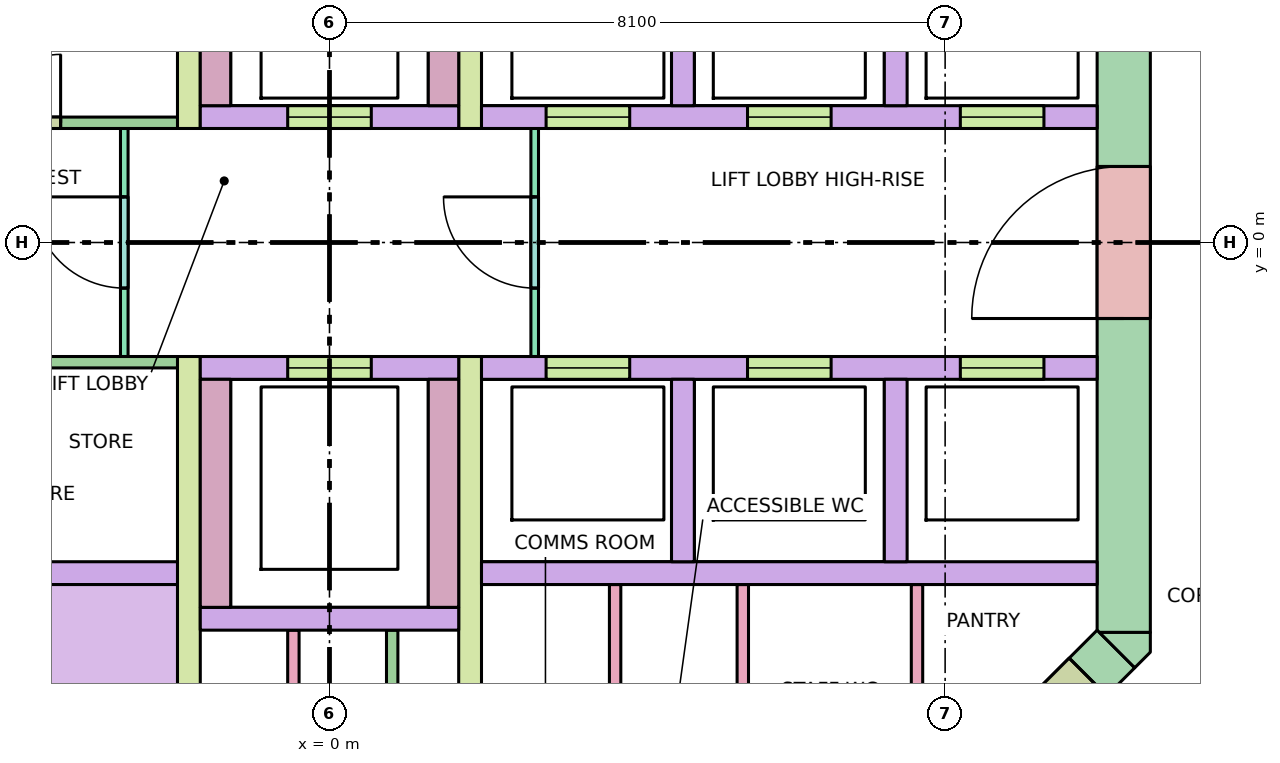
"""IFC4 building model, lengths in metres.
Left out: names, types, materials, properties, quantities, classifications, styles, units other than length and angle.
Written with IfcOpenShell. Run it as: python <this file> out.ifc"""

import sys

from ifc_helpers import new_model, si_unit, direction, frame, frame_2d, origin, place, context, subcontext, project, spatial, polyline, rectangle, outline, extrude, element, fill, save


model = new_model("IFC4")
c1 = context("Model", 3, precision=1e-05, world=origin(), true_north=direction((0.0, 1.0)))
c2 = subcontext(c1, "Body", "Model", "MODEL_VIEW")
j1 = project(units=[si_unit("LENGTHUNIT", "METRE"), si_unit("PLANEANGLEUNIT", "RADIAN")], contexts=[c1])
p1 = place(None, origin())
s1 = spatial("IfcSite", under=j1, at=p1, CompositionType="ELEMENT")
p2 = place(p1, origin())
s2 = spatial("IfcBuilding", under=s1, at=p2, CompositionType="ELEMENT")
p3 = place(p2, frame((0.0, 0.0, 215.0)))
s3 = spatial("IfcBuildingStorey", under=s2, at=p3, CompositionType="ELEMENT", Elevation=215.0)
p4 = place(p3, frame((10.45, -5.13, -0.28), z_axis=(0.0, 0.0, 1.0), x_axis=(0.0, 1.0, 0.0)))
e1 = element("IfcWall", 1, at=p4, inside=s3, PredefinedType="SHEAR", context=c2, shape_type="SweptSolid", body=[
    extrude(rectangle(XDim=10.26, YDim=0.7, at=frame_2d((5.13, 0.0))), origin(), (0.0, 0.0, 1.0), 3.7),
])
p5 = place(p4, frame((4.13, 0.0, 0.28)))
e2 = element("IfcOpeningElement", 2, at=p5, cuts=e1, PredefinedType="OPENING", context=c2, shape_type="SweptSolid", body=[
    extrude(rectangle(XDim=2.0, YDim=2.1, at=frame_2d((1.0, 1.05))), frame((0.0, 0.36, 0.0), z_axis=(0.0, -1.0, 0.0), x_axis=(1.0, 0.0, 0.0)), (0.0, 0.0, 1.0), 0.72),
])
p6 = place(p3, frame((10.347, -5.347, -0.28), z_axis=(0.0, 0.0, 1.0), x_axis=(-0.707106781187, -0.707106781187, 0.0)))
e3 = element("IfcWall", 3, at=p6, inside=s3, PredefinedType="SHEAR", context=c2, shape_type="SweptSolid", body=[
    extrude(rectangle(XDim=4.243, YDim=0.7, at=frame_2d((2.121, 0.0))), origin(), (0.0, 0.0, 1.0), 3.7),
])
p7 = place(p6, frame((0.52, 0.0, 0.28)))
e4 = element("IfcOpeningElement", 4, at=p7, cuts=e3, PredefinedType="OPENING", context=c2, shape_type="SweptSolid", body=[
    extrude(rectangle(XDim=0.9, YDim=2.1, at=frame_2d((0.45, 1.05))), frame((0.0, 0.36, 0.0), z_axis=(0.0, -1.0, 0.0), x_axis=(1.0, 0.0, 0.0)), (0.0, 0.0, 1.0), 0.72),
])
p8 = place(p3, frame((0.0, 0.0, -0.28)))
e5 = element("IfcWall", 5, at=p8, inside=s3, PredefinedType="SHEAR", context=c2, shape_type="SweptSolid", body=[
    extrude(outline(polyline([(10.8, -5.39), (10.595, -5.595), (10.595, -5.595), (10.595, -5.595), (10.13, -5.13), (10.8, -5.13), (10.8, -5.13), (10.8, -5.39)])), origin(), (0.0, 0.0, 1.0), 3.7),
])
for number, where, z_axis, x_axis in (
    (6, (-10.1, -4.35, 0.0), (0.0, 0.0, 1.0), (1.0, 0.0, 0.0)),
    (7, (2.0, -4.35, 0.0), (0.0, 0.0, 1.0), (1.0, 0.0, 0.0)),
):
    element("IfcWall", number, at=place(p3, frame(where, z_axis=z_axis, x_axis=x_axis)), inside=s3, PredefinedType="SOLIDWALL", context=c2, shape_type="SweptSolid", body=[
        extrude(rectangle(XDim=8.1, YDim=0.3, at=frame_2d((4.05, 0.0))), origin(), (0.0, 0.0, 1.0), 3.42),
    ])
p9 = place(p3, frame((2.0, 1.65, 0.0), z_axis=(0.0, 0.0, 1.0), x_axis=(1.0, 0.0, 0.0)))
e8 = element("IfcWall", 8, at=p9, inside=s3, PredefinedType="SOLIDWALL", context=c2, shape_type="SweptSolid", body=[
    extrude(rectangle(XDim=8.1, YDim=0.3, at=frame_2d((4.05, 0.0))), origin(), (0.0, 0.0, 1.0), 3.42),
])
p10 = place(p9, frame((0.85, 0.0, 0.0)))
e9 = element("IfcOpeningElement", 9, at=p10, cuts=e8, PredefinedType="OPENING", context=c2, shape_type="SweptSolid", body=[
    extrude(rectangle(XDim=1.1, YDim=2.1, at=frame_2d((0.55, 1.05))), frame((0.0, 0.16, 0.0), z_axis=(0.0, -1.0, 0.0), x_axis=(1.0, 0.0, 0.0)), (0.0, 0.0, 1.0), 0.32),
])
p11 = place(p9, frame((3.5, 0.0, 0.0)))
e10 = element("IfcOpeningElement", 10, at=p11, cuts=e8, PredefinedType="OPENING", context=c2, shape_type="SweptSolid", body=[
    extrude(rectangle(XDim=1.1, YDim=2.1, at=frame_2d((0.55, 1.05))), frame((0.0, 0.16, 0.0), z_axis=(0.0, -1.0, 0.0), x_axis=(1.0, 0.0, 0.0)), (0.0, 0.0, 1.0), 0.32),
])
p12 = place(p9, frame((6.3, 0.0, 0.0)))
e11 = element("IfcOpeningElement", 11, at=p12, cuts=e8, PredefinedType="OPENING", context=c2, shape_type="SweptSolid", body=[
    extrude(rectangle(XDim=1.1, YDim=2.1, at=frame_2d((0.55, 1.05))), frame((0.0, 0.16, 0.0), z_axis=(0.0, -1.0, 0.0), x_axis=(1.0, 0.0, 0.0)), (0.0, 0.0, 1.0), 0.32),
])
p13 = place(p3, frame((2.0, -1.65, 0.0), z_axis=(0.0, 0.0, 1.0), x_axis=(1.0, 0.0, 0.0)))
e12 = element("IfcWall", 12, at=p13, inside=s3, PredefinedType="SOLIDWALL", context=c2, shape_type="SweptSolid", body=[
    extrude(rectangle(XDim=8.1, YDim=0.3, at=frame_2d((4.05, 0.0))), origin(), (0.0, 0.0, 1.0), 3.42),
])
p14 = place(p13, frame((0.85, 0.0, 0.0)))
e13 = element("IfcOpeningElement", 13, at=p14, cuts=e12, PredefinedType="OPENING", context=c2, shape_type="SweptSolid", body=[
    extrude(rectangle(XDim=1.1, YDim=2.1, at=frame_2d((0.55, 1.05))), frame((0.0, 0.16, 0.0), z_axis=(0.0, -1.0, 0.0), x_axis=(1.0, 0.0, 0.0)), (0.0, 0.0, 1.0), 0.32),
])
p15 = place(p13, frame((3.5, 0.0, 0.0)))
e14 = element("IfcOpeningElement", 14, at=p15, cuts=e12, PredefinedType="OPENING", context=c2, shape_type="SweptSolid", body=[
    extrude(rectangle(XDim=1.1, YDim=2.1, at=frame_2d((0.55, 1.05))), frame((0.0, 0.16, 0.0), z_axis=(0.0, -1.0, 0.0), x_axis=(1.0, 0.0, 0.0)), (0.0, 0.0, 1.0), 0.32),
])
p16 = place(p13, frame((6.3, 0.0, 0.0)))
e15 = element("IfcOpeningElement", 15, at=p16, cuts=e12, PredefinedType="OPENING", context=c2, shape_type="SweptSolid", body=[
    extrude(rectangle(XDim=1.1, YDim=2.1, at=frame_2d((0.55, 1.05))), frame((0.0, 0.16, 0.0), z_axis=(0.0, -1.0, 0.0), x_axis=(1.0, 0.0, 0.0)), (0.0, 0.0, 1.0), 0.32),
])
for number, where, z_axis, x_axis in (
    (16, (4.65, 1.8, 0.0), (0.0, 0.0, 1.0), (0.0, 1.0, 0.0)),
    (17, (4.65, -4.2, 0.0), (0.0, 0.0, 1.0), (0.0, 1.0, 0.0)),
    (18, (7.45, 1.8, 0.0), (0.0, 0.0, 1.0), (0.0, 1.0, 0.0)),
    (19, (7.45, -4.2, 0.0), (0.0, 0.0, 1.0), (0.0, 1.0, 0.0)),
):
    element("IfcWall", number, at=place(p3, frame(where, z_axis=z_axis, x_axis=x_axis)), inside=s3, PredefinedType="SOLIDWALL", context=c2, shape_type="SweptSolid", body=[
        extrude(rectangle(XDim=2.4, YDim=0.3, at=frame_2d((1.2, 0.0))), origin(), (0.0, 0.0, 1.0), 3.42),
    ])
for number, where, z_axis, x_axis in (
    (20, (-1.85, 1.5, 0.0), (0.0, 0.0, 1.0), (0.0, 1.0, 0.0)),
    (21, (-1.85, -8.1, 0.0), (0.0, 0.0, 1.0), (0.0, 1.0, 0.0)),
    (22, (1.85, 1.5, 0.0), (0.0, 0.0, 1.0), (0.0, 1.0, 0.0)),
    (23, (1.85, -8.1, 0.0), (0.0, 0.0, 1.0), (0.0, 1.0, 0.0)),
):
    element("IfcWall", number, at=place(p3, frame(where, z_axis=z_axis, x_axis=x_axis)), inside=s3, PredefinedType="SHEAR", context=c2, shape_type="SweptSolid", body=[
        extrude(rectangle(XDim=6.6, YDim=0.3, at=frame_2d((3.3, 0.0))), origin(), (0.0, 0.0, 1.0), 3.42),
    ])
p17 = place(p3, frame((-1.7, 1.65, 0.0), z_axis=(0.0, 0.0, 1.0), x_axis=(1.0, 0.0, 0.0)))
e24 = element("IfcWall", 24, at=p17, inside=s3, PredefinedType="SOLIDWALL", context=c2, shape_type="SweptSolid", body=[
    extrude(rectangle(XDim=3.4, YDim=0.3, at=frame_2d((1.7, 0.0))), origin(), (0.0, 0.0, 1.0), 3.42),
])
p18 = place(p17, frame((1.15, 0.0, 0.0)))
e25 = element("IfcOpeningElement", 25, at=p18, cuts=e24, PredefinedType="OPENING", context=c2, shape_type="SweptSolid", body=[
    extrude(rectangle(XDim=1.1, YDim=2.1, at=frame_2d((0.55, 1.05))), frame((0.0, 0.16, 0.0), z_axis=(0.0, -1.0, 0.0), x_axis=(1.0, 0.0, 0.0)), (0.0, 0.0, 1.0), 0.32),
])
p19 = place(p3, frame((-1.7, -1.65, 0.0), z_axis=(0.0, 0.0, 1.0), x_axis=(1.0, 0.0, 0.0)))
e26 = element("IfcWall", 26, at=p19, inside=s3, PredefinedType="SOLIDWALL", context=c2, shape_type="SweptSolid", body=[
    extrude(rectangle(XDim=3.4, YDim=0.3, at=frame_2d((1.7, 0.0))), origin(), (0.0, 0.0, 1.0), 3.42),
])
p20 = place(p19, frame((1.15, 0.0, 0.0)))
e27 = element("IfcOpeningElement", 27, at=p20, cuts=e26, PredefinedType="OPENING", context=c2, shape_type="SweptSolid", body=[
    extrude(rectangle(XDim=1.1, YDim=2.1, at=frame_2d((0.55, 1.05))), frame((0.0, 0.16, 0.0), z_axis=(0.0, -1.0, 0.0), x_axis=(1.0, 0.0, 0.0)), (0.0, 0.0, 1.0), 0.32),
])
for number, where, z_axis, x_axis in (
    (28, (-1.5, 1.8, 0.0), (0.0, 0.0, 1.0), (0.0, 1.0, 0.0)),
    (29, (-1.5, -4.8, 0.0), (0.0, 0.0, 1.0), (0.0, 1.0, 0.0)),
    (30, (1.5, 1.8, 0.0), (0.0, 0.0, 1.0), (0.0, 1.0, 0.0)),
    (31, (1.5, -4.8, 0.0), (0.0, 0.0, 1.0), (0.0, 1.0, 0.0)),
):
    element("IfcWall", number, at=place(p3, frame(where, z_axis=z_axis, x_axis=x_axis)), inside=s3, PredefinedType="SOLIDWALL", context=c2, shape_type="SweptSolid", body=[
        extrude(rectangle(XDim=3.0, YDim=0.4, at=frame_2d((1.5, 0.0))), origin(), (0.0, 0.0, 1.0), 3.42),
    ])
p21 = place(p3, frame((-1.7, -4.95, 0.0), z_axis=(0.0, 0.0, 1.0), x_axis=(1.0, 0.0, 0.0)))
e32 = element("IfcWall", 32, at=p21, inside=s3, PredefinedType="SOLIDWALL", context=c2, shape_type="SweptSolid", body=[
    extrude(rectangle(XDim=3.4, YDim=0.3, at=frame_2d((1.7, 0.0))), origin(), (0.0, 0.0, 1.0), 3.42),
])
p22 = place(p3, frame((-2.7, -1.5, 0.0), z_axis=(0.0, 0.0, 1.0), x_axis=(0.0, 1.0, 0.0)))
e33 = element("IfcWall", 33, at=p22, inside=s3, PredefinedType="PARTITIONING", context=c2, shape_type="SweptSolid", body=[
    extrude(rectangle(XDim=3.0, YDim=0.1, at=frame_2d((1.5, 0.0))), origin(), (0.0, 0.0, 1.0), 3.42),
])
p23 = place(p22, frame((0.9, 0.0, 0.0)))
e34 = element("IfcOpeningElement", 34, at=p23, cuts=e33, PredefinedType="OPENING", context=c2, shape_type="SweptSolid", body=[
    extrude(rectangle(XDim=1.2, YDim=2.1, at=frame_2d((0.6, 1.05))), frame((0.0, 0.06, 0.0), z_axis=(0.0, -1.0, 0.0), x_axis=(1.0, 0.0, 0.0)), (0.0, 0.0, 1.0), 0.12),
])
p24 = place(p3, frame((2.7, -1.5, 0.0), z_axis=(0.0, 0.0, 1.0), x_axis=(0.0, 1.0, 0.0)))
e35 = element("IfcWall", 35, at=p24, inside=s3, PredefinedType="PARTITIONING", context=c2, shape_type="SweptSolid", body=[
    extrude(rectangle(XDim=3.0, YDim=0.1, at=frame_2d((1.5, 0.0))), origin(), (0.0, 0.0, 1.0), 3.42),
])
p25 = place(p24, frame((0.9, 0.0, 0.0)))
e36 = element("IfcOpeningElement", 36, at=p25, cuts=e35, PredefinedType="OPENING", context=c2, shape_type="SweptSolid", body=[
    extrude(rectangle(XDim=1.2, YDim=2.1, at=frame_2d((0.6, 1.05))), frame((0.0, 0.06, 0.0), z_axis=(0.0, -1.0, 0.0), x_axis=(1.0, 0.0, 0.0)), (0.0, 0.0, 1.0), 0.12),
])
for number, where, z_axis, x_axis in (
    (37, (0.825, -8.1, 0.0), (0.0, 0.0, 1.0), (0.0, 1.0, 0.0)),
    (38, (-0.475, -8.1, 0.0), (0.0, 0.0, 1.0), (0.0, 1.0, 0.0)),
):
    element("IfcWall", number, at=place(p3, frame(where, z_axis=z_axis, x_axis=x_axis)), inside=s3, PredefinedType="PARTITIONING", context=c2, shape_type="SweptSolid", body=[
        extrude(rectangle(XDim=3.0, YDim=0.15, at=frame_2d((1.5, 0.0))), origin(), (0.0, 0.0, 1.0), 3.42),
    ])
for number, where, z_axis, x_axis in (
    (39, (3.758, -8.1, 0.0), (0.0, 0.0, 1.0), (0.0, 1.0, 0.0)),
    (40, (5.438, -8.1, 0.0), (0.0, 0.0, 1.0), (0.0, 1.0, 0.0)),
):
    element("IfcWall", number, at=place(p3, frame(where, z_axis=z_axis, x_axis=x_axis)), inside=s3, PredefinedType="PARTITIONING", context=c2, shape_type="SweptSolid", body=[
        extrude(rectangle(XDim=3.6, YDim=0.15, at=frame_2d((1.8, 0.0))), origin(), (0.0, 0.0, 1.0), 3.42),
    ])
p26 = place(p3, frame((7.73, -7.395, 0.0), z_axis=(0.0, 0.0, 1.0), x_axis=(0.0, 1.0, 0.0)))
e41 = element("IfcWall", 41, at=p26, inside=s3, PredefinedType="PARTITIONING", context=c2, shape_type="SweptSolid", body=[
    extrude(rectangle(XDim=2.895, YDim=0.15, at=frame_2d((1.448, 0.0))), origin(), (0.0, 0.0, 1.0), 3.42),
])
p27 = place(p3, frame((-10.1, 1.575, 0.0), z_axis=(0.0, 0.0, 1.0), x_axis=(1.0, 0.0, 0.0)))
e42 = element("IfcWall", 42, at=p27, inside=s3, PredefinedType="PARTITIONING", context=c2, shape_type="SweptSolid", body=[
    extrude(rectangle(XDim=8.1, YDim=0.15, at=frame_2d((4.05, 0.0))), origin(), (0.0, 0.0, 1.0), 3.42),
])
p28 = place(p27, frame((1.538, 0.0, 0.0)))
e43 = element("IfcOpeningElement", 43, at=p28, cuts=e42, PredefinedType="OPENING", context=c2, shape_type="SweptSolid", body=[
    extrude(rectangle(XDim=0.9, YDim=2.1, at=frame_2d((0.45, 1.05))), frame((0.0, 0.085, 0.0), z_axis=(0.0, -1.0, 0.0), x_axis=(1.0, 0.0, 0.0)), (0.0, 0.0, 1.0), 0.17),
])
p29 = place(p27, frame((5.663, 0.0, 0.0)))
e44 = element("IfcOpeningElement", 44, at=p29, cuts=e42, PredefinedType="OPENING", context=c2, shape_type="SweptSolid", body=[
    extrude(rectangle(XDim=0.9, YDim=2.1, at=frame_2d((0.45, 1.05))), frame((0.0, 0.085, 0.0), z_axis=(0.0, -1.0, 0.0), x_axis=(1.0, 0.0, 0.0)), (0.0, 0.0, 1.0), 0.17),
])
p30 = place(p3, frame((-10.1, -1.575, 0.0), z_axis=(0.0, 0.0, 1.0), x_axis=(1.0, 0.0, 0.0)))
e45 = element("IfcWall", 45, at=p30, inside=s3, PredefinedType="PARTITIONING", context=c2, shape_type="SweptSolid", body=[
    extrude(rectangle(XDim=8.1, YDim=0.15, at=frame_2d((4.05, 0.0))), origin(), (0.0, 0.0, 1.0), 3.42),
])
p31 = place(p30, frame((0.33, 0.0, 0.0)))
e46 = element("IfcOpeningElement", 46, at=p31, cuts=e45, PredefinedType="OPENING", context=c2, shape_type="SweptSolid", body=[
    extrude(rectangle(XDim=0.9, YDim=2.1, at=frame_2d((0.45, 1.05))), frame((0.0, 0.085, 0.0), z_axis=(0.0, -1.0, 0.0), x_axis=(1.0, 0.0, 0.0)), (0.0, 0.0, 1.0), 0.17),
])
p32 = place(p30, frame((2.04, 0.0, 0.0)))
e47 = element("IfcOpeningElement", 47, at=p32, cuts=e45, PredefinedType="OPENING", context=c2, shape_type="SweptSolid", body=[
    extrude(rectangle(XDim=0.9, YDim=2.1, at=frame_2d((0.45, 1.05))), frame((0.0, 0.085, 0.0), z_axis=(0.0, -1.0, 0.0), x_axis=(1.0, 0.0, 0.0)), (0.0, 0.0, 1.0), 0.17),
])
p33 = place(p30, frame((5.31, 0.0, 0.0)))
e48 = element("IfcOpeningElement", 48, at=p33, cuts=e45, PredefinedType="OPENING", context=c2, shape_type="SweptSolid", body=[
    extrude(rectangle(XDim=0.9, YDim=2.1, at=frame_2d((0.45, 1.05))), frame((0.0, 0.085, 0.0), z_axis=(0.0, -1.0, 0.0), x_axis=(1.0, 0.0, 0.0)), (0.0, 0.0, 1.0), 0.17),
])
p34 = place(p10, origin())
e49 = element("IfcDoor", 49, at=p34, inside=s3, OperationType="DOUBLE_DOOR_SLIDING", PredefinedType="DOOR", context=c2, shape_type="SweptSolid", body=[
    extrude(rectangle(XDim=1.1, YDim=2.1, at=frame_2d((0.55, 1.05))), frame((0.0, 0.025, 0.0), z_axis=(0.0, -1.0, 0.0), x_axis=(1.0, 0.0, 0.0)), (0.0, 0.0, 1.0), 0.05),
])
fill(e9, e49)
p35 = place(p11, origin())
e50 = element("IfcDoor", 50, at=p35, inside=s3, OperationType="DOUBLE_DOOR_SLIDING", PredefinedType="DOOR", context=c2, shape_type="SweptSolid", body=[
    extrude(rectangle(XDim=1.1, YDim=2.1, at=frame_2d((0.55, 1.05))), frame((0.0, 0.025, 0.0), z_axis=(0.0, -1.0, 0.0), x_axis=(1.0, 0.0, 0.0)), (0.0, 0.0, 1.0), 0.05),
])
fill(e10, e50)
p36 = place(p12, origin())
e51 = element("IfcDoor", 51, at=p36, inside=s3, OperationType="DOUBLE_DOOR_SLIDING", PredefinedType="DOOR", context=c2, shape_type="SweptSolid", body=[
    extrude(rectangle(XDim=1.1, YDim=2.1, at=frame_2d((0.55, 1.05))), frame((0.0, 0.025, 0.0), z_axis=(0.0, -1.0, 0.0), x_axis=(1.0, 0.0, 0.0)), (0.0, 0.0, 1.0), 0.05),
])
fill(e11, e51)
p37 = place(p14, origin())
e52 = element("IfcDoor", 52, at=p37, inside=s3, OperationType="DOUBLE_DOOR_SLIDING", PredefinedType="DOOR", context=c2, shape_type="SweptSolid", body=[
    extrude(rectangle(XDim=1.1, YDim=2.1, at=frame_2d((0.55, 1.05))), frame((0.0, 0.025, 0.0), z_axis=(0.0, -1.0, 0.0), x_axis=(1.0, 0.0, 0.0)), (0.0, 0.0, 1.0), 0.05),
])
fill(e13, e52)
p38 = place(p15, origin())
e53 = element("IfcDoor", 53, at=p38, inside=s3, OperationType="DOUBLE_DOOR_SLIDING", PredefinedType="DOOR", context=c2, shape_type="SweptSolid", body=[
    extrude(rectangle(XDim=1.1, YDim=2.1, at=frame_2d((0.55, 1.05))), frame((0.0, 0.025, 0.0), z_axis=(0.0, -1.0, 0.0), x_axis=(1.0, 0.0, 0.0)), (0.0, 0.0, 1.0), 0.05),
])
fill(e14, e53)
p39 = place(p16, origin())
e54 = element("IfcDoor", 54, at=p39, inside=s3, OperationType="DOUBLE_DOOR_SLIDING", PredefinedType="DOOR", context=c2, shape_type="SweptSolid", body=[
    extrude(rectangle(XDim=1.1, YDim=2.1, at=frame_2d((0.55, 1.05))), frame((0.0, 0.025, 0.0), z_axis=(0.0, -1.0, 0.0), x_axis=(1.0, 0.0, 0.0)), (0.0, 0.0, 1.0), 0.05),
])
fill(e15, e54)
p40 = place(p18, origin())
e55 = element("IfcDoor", 55, at=p40, inside=s3, OperationType="DOUBLE_DOOR_SLIDING", PredefinedType="DOOR", context=c2, shape_type="SweptSolid", body=[
    extrude(rectangle(XDim=1.1, YDim=2.1, at=frame_2d((0.55, 1.05))), frame((0.0, 0.025, 0.0), z_axis=(0.0, -1.0, 0.0), x_axis=(1.0, 0.0, 0.0)), (0.0, 0.0, 1.0), 0.05),
])
fill(e25, e55)
p41 = place(p20, origin())
e56 = element("IfcDoor", 56, at=p41, inside=s3, OperationType="DOUBLE_DOOR_SLIDING", PredefinedType="DOOR", context=c2, shape_type="SweptSolid", body=[
    extrude(rectangle(XDim=1.1, YDim=2.1, at=frame_2d((0.55, 1.05))), frame((0.0, 0.025, 0.0), z_axis=(0.0, -1.0, 0.0), x_axis=(1.0, 0.0, 0.0)), (0.0, 0.0, 1.0), 0.05),
])
fill(e27, e56)
p42 = place(p5, origin())
e57 = element("IfcDoor", 57, at=p42, inside=s3, OperationType="DOUBLE_DOOR_SINGLE_SWING", PredefinedType="DOOR", context=c2, shape_type="SweptSolid", body=[
    extrude(rectangle(XDim=2.0, YDim=2.1, at=frame_2d((1.0, 1.05))), frame((0.0, 0.025, 0.0), z_axis=(0.0, -1.0, 0.0), x_axis=(1.0, 0.0, 0.0)), (0.0, 0.0, 1.0), 0.05),
])
fill(e2, e57)
p43 = place(p23, origin())
e58 = element("IfcDoor", 58, at=p43, inside=s3, OperationType="SINGLE_SWING_RIGHT", PredefinedType="DOOR", context=c2, shape_type="SweptSolid", body=[
    extrude(rectangle(XDim=1.2, YDim=2.1, at=frame_2d((0.6, 1.05))), frame((0.0, 0.025, 0.0), z_axis=(0.0, -1.0, 0.0), x_axis=(1.0, 0.0, 0.0)), (0.0, 0.0, 1.0), 0.05),
])
fill(e34, e58)
p44 = place(p25, origin())
e59 = element("IfcDoor", 59, at=p44, inside=s3, OperationType="SINGLE_SWING_RIGHT", PredefinedType="DOOR", context=c2, shape_type="SweptSolid", body=[
    extrude(rectangle(XDim=1.2, YDim=2.1, at=frame_2d((0.6, 1.05))), frame((0.0, 0.025, 0.0), z_axis=(0.0, -1.0, 0.0), x_axis=(1.0, 0.0, 0.0)), (0.0, 0.0, 1.0), 0.05),
])
fill(e36, e59)
p45 = place(p7, origin())
e60 = element("IfcDoor", 60, at=p45, inside=s3, OperationType="SINGLE_SWING_RIGHT", PredefinedType="DOOR", context=c2, shape_type="SweptSolid", body=[
    extrude(rectangle(XDim=0.9, YDim=2.1, at=frame_2d((0.45, 1.05))), frame((0.0, 0.025, 0.0), z_axis=(0.0, -1.0, 0.0), x_axis=(1.0, 0.0, 0.0)), (0.0, 0.0, 1.0), 0.05),
])
fill(e4, e60)
p46 = place(p29, origin())
e61 = element("IfcDoor", 61, at=p46, inside=s3, OperationType="SINGLE_SWING_RIGHT", PredefinedType="DOOR", context=c2, shape_type="SweptSolid", body=[
    extrude(rectangle(XDim=0.9, YDim=2.1, at=frame_2d((0.45, 1.05))), frame((0.0, 0.025, 0.0), z_axis=(0.0, -1.0, 0.0), x_axis=(1.0, 0.0, 0.0)), (0.0, 0.0, 1.0), 0.05),
])
fill(e44, e61)
save(model, sys.argv[1])
